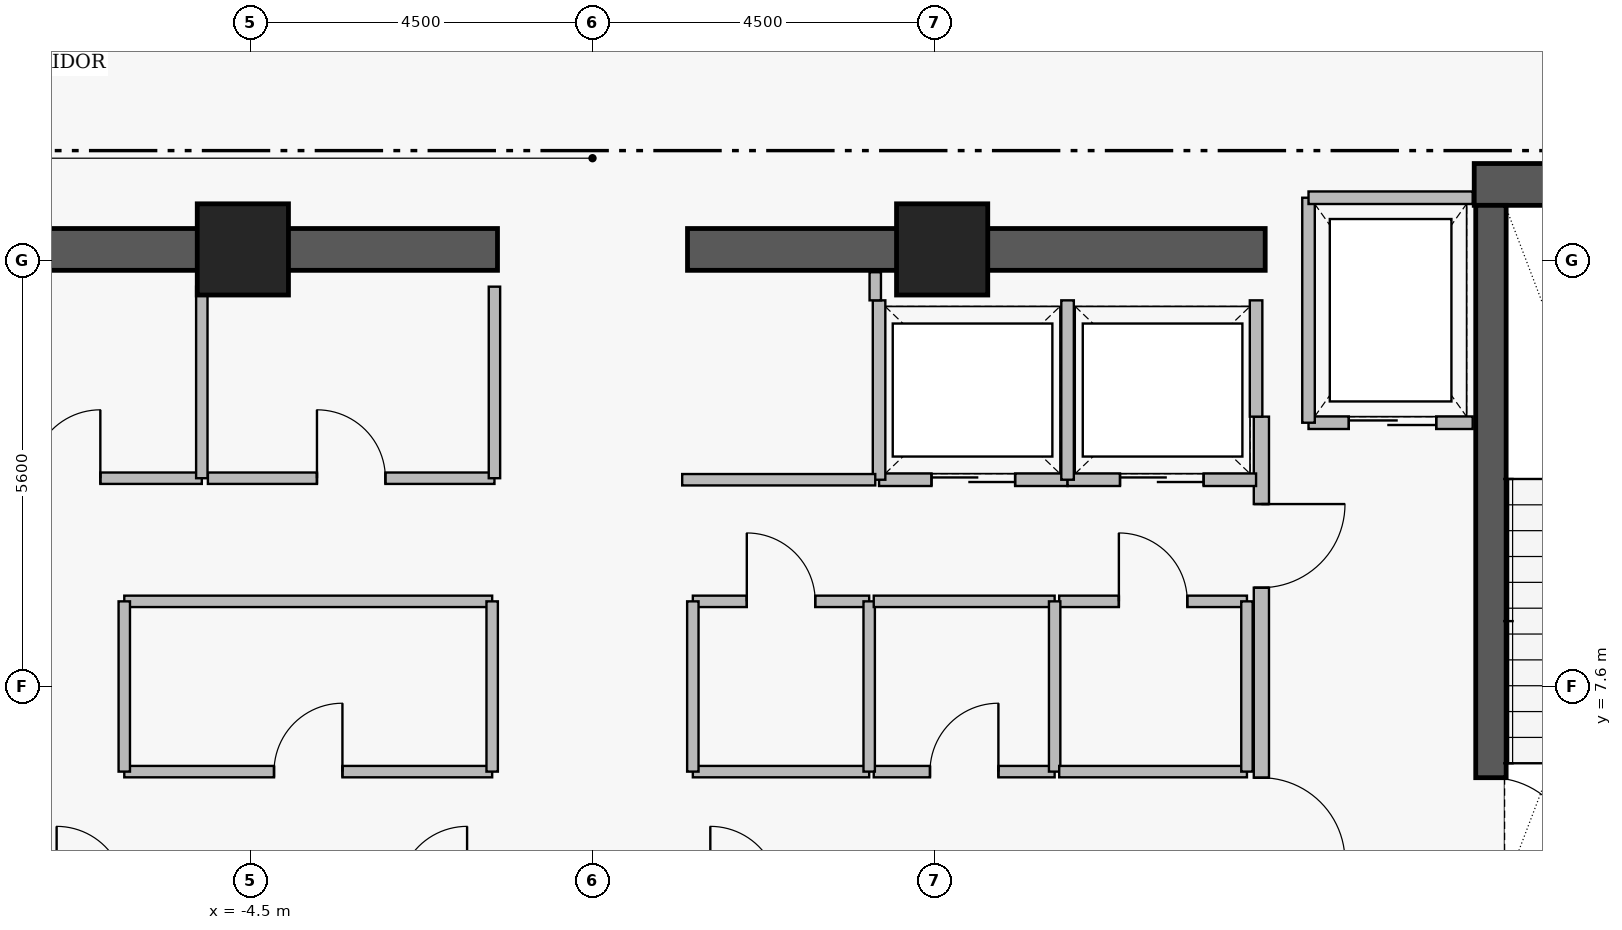
"""IFC4 building model, lengths in metres.
Left out: names, types, materials, properties, quantities, classifications, styles, units other than length and angle.
Written with IfcOpenShell. Run it as: python <this file> out.ifc"""

import sys

from ifc_helpers import new_model, si_unit, direction, frame, frame_2d, origin, origin_2d, place, context, subcontext, project, spatial, rectangle, extrude, element, fill, save


model = new_model("IFC4")
c1 = context("Model", 3, precision=1e-05, world=origin(), true_north=direction((0.0, 1.0)))
c2 = subcontext(c1, "Body", "Model", "MODEL_VIEW")
j1 = project(units=[si_unit("LENGTHUNIT", "METRE"), si_unit("PLANEANGLEUNIT", "RADIAN")], contexts=[c1])
p1 = place(None, origin())
s1 = spatial("IfcSite", under=j1, at=p1, CompositionType="ELEMENT")
p2 = place(p1, origin())
s2 = spatial("IfcBuilding", under=s1, at=p2, CompositionType="ELEMENT")
p3 = place(p2, frame((0.0, 0.0, 284.05)))
s3 = spatial("IfcBuildingStorey", under=s2, at=p3, CompositionType="ELEMENT", Elevation=284.05)
p4 = place(p3, frame((11.6, 14.205, 0.0), z_axis=(0.0, 0.0, 1.0), x_axis=(1.0, 0.0, 0.0)))
e1 = element("IfcWall", 1, at=p4, inside=s3, PredefinedType="SHEAR", context=c2, shape_type="SweptSolid", body=[
    extrude(rectangle(XDim=4.36, YDim=0.55, at=frame_2d((2.18, 0.0))), origin(), (0.0, 0.0, 1.0), 4.21),
])
for number, where, z_axis, x_axis in (
    (2, (-8.85, 13.35, 0.0), (0.0, 0.0, 1.0), (1.0, 0.0, 0.0)),
    (3, (1.25, 13.35, 0.0), (0.0, 0.0, 1.0), (1.0, 0.0, 0.0)),
):
    element("IfcWall", number, at=place(p3, frame(where, z_axis=z_axis, x_axis=x_axis)), inside=s3, PredefinedType="SHEAR", context=c2, shape_type="SweptSolid", body=[
        extrude(rectangle(XDim=7.6, YDim=0.55, at=frame_2d((3.8, 0.0))), origin(), (0.0, 0.0, 1.0), 4.18),
    ])
p5 = place(p3, frame((11.82, 13.93, 0.0), z_axis=(0.0, 0.0, 1.0), x_axis=(0.0, -1.0, 0.0)))
e4 = element("IfcWall", 4, at=p5, inside=s3, PredefinedType="SHEAR", context=c2, shape_type="SweptSolid", body=[
    extrude(rectangle(XDim=8.96, YDim=0.4, at=frame_2d((4.48, 0.0))), origin(), (0.0, 0.0, 1.0), 4.21),
])
p6 = place(p5, frame((7.53, 0.0, 0.0)))
e5 = element("IfcOpeningElement", 5, at=p6, cuts=e4, PredefinedType="OPENING", context=c2, shape_type="SweptSolid", body=[
    extrude(rectangle(XDim=1.12, YDim=2.22, at=frame_2d((0.56, 1.11))), frame((0.0, 0.21, 0.0), z_axis=(0.0, -1.0, 0.0), x_axis=(1.0, 0.0, 0.0)), (0.0, 0.0, 1.0), 0.42),
])
for number, where, z_axis, x_axis in (
    (6, (-4.6, 13.35, 0.0), (0.0, 0.0, 1.0), (1.0, 0.0, 0.0)),
    (7, (4.6, 13.35, 0.0), (0.0, 0.0, 1.0), (1.0, 0.0, 0.0)),
):
    element("IfcColumn", number, at=place(p3, frame(where, z_axis=z_axis, x_axis=x_axis)), inside=s3, PredefinedType="COLUMN", context=c2, shape_type="SweptSolid", body=[
        extrude(rectangle(XDim=1.2, YDim=1.2, at=origin_2d()), origin(), (0.0, 0.0, 1.0), 4.4),
    ])
p7 = place(p3, frame((8.8, 11.15, 0.0), z_axis=(0.0, 0.0, 1.0), x_axis=(0.0, -1.0, 0.0)))
e8 = element("IfcWall", 8, at=p7, inside=s3, PredefinedType="PARTITIONING", context=c2, shape_type="SweptSolid", body=[
    extrude(rectangle(XDim=6.1, YDim=0.2, at=frame_2d((3.05, 0.0))), origin(), (0.0, 0.0, 1.0), 4.18),
])
p8 = place(p7, frame((1.15, 0.0, 0.0)))
e9 = element("IfcOpeningElement", 9, at=p8, cuts=e8, PredefinedType="OPENING", context=c2, shape_type="SweptSolid", body=[
    extrude(rectangle(XDim=1.1, YDim=2.2, at=frame_2d((0.55, 1.1))), frame((0.0, 0.11, 0.0), z_axis=(0.0, -1.0, 0.0), x_axis=(1.0, 0.0, 0.0)), (0.0, 0.0, 1.0), 0.22),
])
p9 = place(p7, frame((4.75, 0.0, 0.0)))
e10 = element("IfcOpeningElement", 10, at=p9, cuts=e8, PredefinedType="OPENING", context=c2, shape_type="SweptSolid", body=[
    extrude(rectangle(XDim=1.1, YDim=2.2, at=frame_2d((0.55, 1.1))), frame((0.0, 0.11, 0.0), z_axis=(0.0, -1.0, 0.0), x_axis=(1.0, 0.0, 0.0)), (0.0, 0.0, 1.0), 0.22),
])
p10 = place(p3, frame((9.42, 11.07, 0.0), z_axis=(0.0, 0.0, 1.0), x_axis=(1.0, 0.0, 0.0)))
e11 = element("IfcWall", 11, at=p10, inside=s3, PredefinedType="PARTITIONING", context=c2, shape_type="SweptSolid", body=[
    extrude(rectangle(XDim=2.16, YDim=0.165, at=frame_2d((1.08, 0.0))), origin(), (0.0, 0.0, 1.0), 4.18),
])
p11 = place(p10, frame((0.53, 0.0, 0.0)))
e12 = element("IfcOpeningElement", 12, at=p11, cuts=e11, PredefinedType="OPENING", context=c2, shape_type="SweptSolid", body=[
    extrude(rectangle(XDim=1.15, YDim=2.25, at=frame_2d((0.575, 1.125))), frame((0.0, 0.093, 0.0), z_axis=(0.0, -1.0, 0.0), x_axis=(1.0, 0.0, 0.0)), (0.0, 0.0, 1.0), 0.185),
])
p12 = place(p3, frame((3.77, 10.32, 0.0), z_axis=(0.0, 0.0, 1.0), x_axis=(1.0, 0.0, 0.0)))
e13 = element("IfcWall", 13, at=p12, inside=s3, PredefinedType="PARTITIONING", context=c2, shape_type="SweptSolid", body=[
    extrude(rectangle(XDim=2.48, YDim=0.165, at=frame_2d((1.24, 0.0))), origin(), (0.0, 0.0, 1.0), 4.18),
])
p13 = place(p12, frame((0.69, 0.0, 0.0)))
e14 = element("IfcOpeningElement", 14, at=p13, cuts=e13, PredefinedType="OPENING", context=c2, shape_type="SweptSolid", body=[
    extrude(rectangle(XDim=1.1, YDim=2.25, at=frame_2d((0.55, 1.125))), frame((0.0, 0.093, 0.0), z_axis=(0.0, -1.0, 0.0), x_axis=(1.0, 0.0, 0.0)), (0.0, 0.0, 1.0), 0.185),
])
p14 = place(p3, frame((6.25, 10.32, 0.0), z_axis=(0.0, 0.0, 1.0), x_axis=(1.0, 0.0, 0.0)))
e15 = element("IfcWall", 15, at=p14, inside=s3, PredefinedType="PARTITIONING", context=c2, shape_type="SweptSolid", body=[
    extrude(rectangle(XDim=2.48, YDim=0.165, at=frame_2d((1.24, 0.0))), origin(), (0.0, 0.0, 1.0), 4.18),
])
p15 = place(p14, frame((0.69, 0.0, 0.0)))
e16 = element("IfcOpeningElement", 16, at=p15, cuts=e15, PredefinedType="OPENING", context=c2, shape_type="SweptSolid", body=[
    extrude(rectangle(XDim=1.1, YDim=2.25, at=frame_2d((0.55, 1.125))), frame((0.0, 0.093, 0.0), z_axis=(0.0, -1.0, 0.0), x_axis=(1.0, 0.0, 0.0)), (0.0, 0.0, 1.0), 0.185),
])
p16 = place(p3, frame((-8.71, 10.34, 0.0), z_axis=(0.0, 0.0, 1.0), x_axis=(1.0, 0.0, 0.0)))
e17 = element("IfcWall", 17, at=p16, inside=s3, PredefinedType="PARTITIONING", context=c2, shape_type="SweptSolid", body=[
    extrude(rectangle(XDim=3.57, YDim=0.15, at=frame_2d((1.785, 0.0))), origin(), (0.0, 0.0, 1.0), 4.18),
])
p17 = place(p16, frame((1.335, 0.0, 0.0)))
e18 = element("IfcOpeningElement", 18, at=p17, cuts=e17, PredefinedType="OPENING", context=c2, shape_type="SweptSolid", body=[
    extrude(rectangle(XDim=0.9, YDim=2.15, at=frame_2d((0.45, 1.075))), frame((0.0, 0.085, 0.0), z_axis=(0.0, -1.0, 0.0), x_axis=(1.0, 0.0, 0.0)), (0.0, 0.0, 1.0), 0.17),
])
p18 = place(p3, frame((-5.06, 10.34, 0.0), z_axis=(0.0, 0.0, 1.0), x_axis=(1.0, 0.0, 0.0)))
e19 = element("IfcWall", 19, at=p18, inside=s3, PredefinedType="PARTITIONING", context=c2, shape_type="SweptSolid", body=[
    extrude(rectangle(XDim=3.77, YDim=0.15, at=frame_2d((1.885, 0.0))), origin(), (0.0, 0.0, 1.0), 4.18),
])
p19 = place(p18, frame((1.435, 0.0, 0.0)))
e20 = element("IfcOpeningElement", 20, at=p19, cuts=e19, PredefinedType="OPENING", context=c2, shape_type="SweptSolid", body=[
    extrude(rectangle(XDim=0.9, YDim=2.15, at=frame_2d((0.45, 1.075))), frame((0.0, 0.085, 0.0), z_axis=(0.0, -1.0, 0.0), x_axis=(1.0, 0.0, 0.0)), (0.0, 0.0, 1.0), 0.17),
])
p20 = place(p3, frame((-6.16, 6.48, 0.0), z_axis=(0.0, 0.0, 1.0), x_axis=(1.0, 0.0, 0.0)))
e21 = element("IfcWall", 21, at=p20, inside=s3, PredefinedType="PARTITIONING", context=c2, shape_type="SweptSolid", body=[
    extrude(rectangle(XDim=4.84, YDim=0.15, at=frame_2d((2.42, 0.0))), origin(), (0.0, 0.0, 1.0), 4.18),
])
p21 = place(p20, frame((1.97, 0.0, 0.0)))
e22 = element("IfcOpeningElement", 22, at=p21, cuts=e21, PredefinedType="OPENING", context=c2, shape_type="SweptSolid", body=[
    extrude(rectangle(XDim=0.9, YDim=2.15, at=frame_2d((0.45, 1.075))), frame((0.0, 0.085, 0.0), z_axis=(0.0, -1.0, 0.0), x_axis=(1.0, 0.0, 0.0)), (0.0, 0.0, 1.0), 0.17),
])
p22 = place(p3, frame((1.32, 8.72, 0.0), z_axis=(0.0, 0.0, 1.0), x_axis=(1.0, 0.0, 0.0)))
e23 = element("IfcWall", 23, at=p22, inside=s3, PredefinedType="PARTITIONING", context=c2, shape_type="SweptSolid", body=[
    extrude(rectangle(XDim=2.32, YDim=0.15, at=frame_2d((1.16, 0.0))), origin(), (0.0, 0.0, 1.0), 4.18),
])
p23 = place(p22, frame((0.71, 0.0, 0.0)))
e24 = element("IfcOpeningElement", 24, at=p23, cuts=e23, PredefinedType="OPENING", context=c2, shape_type="SweptSolid", body=[
    extrude(rectangle(XDim=0.9, YDim=2.15, at=frame_2d((0.45, 1.075))), frame((0.0, 0.085, 0.0), z_axis=(0.0, -1.0, 0.0), x_axis=(1.0, 0.0, 0.0)), (0.0, 0.0, 1.0), 0.17),
])
p24 = place(p3, frame((3.7, 6.48, 0.0), z_axis=(0.0, 0.0, 1.0), x_axis=(1.0, 0.0, 0.0)))
e25 = element("IfcWall", 25, at=p24, inside=s3, PredefinedType="PARTITIONING", context=c2, shape_type="SweptSolid", body=[
    extrude(rectangle(XDim=2.38, YDim=0.15, at=frame_2d((1.19, 0.0))), origin(), (0.0, 0.0, 1.0), 4.18),
])
p25 = place(p24, frame((0.74, 0.0, 0.0)))
e26 = element("IfcOpeningElement", 26, at=p25, cuts=e25, PredefinedType="OPENING", context=c2, shape_type="SweptSolid", body=[
    extrude(rectangle(XDim=0.9, YDim=2.15, at=frame_2d((0.45, 1.075))), frame((0.0, 0.085, 0.0), z_axis=(0.0, -1.0, 0.0), x_axis=(1.0, 0.0, 0.0)), (0.0, 0.0, 1.0), 0.17),
])
p26 = place(p3, frame((6.14, 8.72, 0.0), z_axis=(0.0, 0.0, 1.0), x_axis=(1.0, 0.0, 0.0)))
e27 = element("IfcWall", 27, at=p26, inside=s3, PredefinedType="PARTITIONING", context=c2, shape_type="SweptSolid", body=[
    extrude(rectangle(XDim=2.47, YDim=0.15, at=frame_2d((1.235, 0.0))), origin(), (0.0, 0.0, 1.0), 4.18),
])
p27 = place(p26, frame((0.785, 0.0, 0.0)))
e28 = element("IfcOpeningElement", 28, at=p27, cuts=e27, PredefinedType="OPENING", context=c2, shape_type="SweptSolid", body=[
    extrude(rectangle(XDim=0.9, YDim=2.15, at=frame_2d((0.45, 1.075))), frame((0.0, 0.085, 0.0), z_axis=(0.0, -1.0, 0.0), x_axis=(1.0, 0.0, 0.0)), (0.0, 0.0, 1.0), 0.17),
])
p28 = place(p3, frame((9.42, 11.07, 0.0), z_axis=(0.0, 0.0, 1.0), x_axis=(0.0, 1.0, 0.0)))
e29 = element("IfcWall", 29, at=p28, inside=s3, PredefinedType="PARTITIONING", context=c2, shape_type="SweptSolid", body=[
    extrude(rectangle(XDim=2.96, YDim=0.165, at=frame_2d((1.48, 0.0))), origin(), (0.0, 0.0, 1.0), 4.18),
])
p29 = place(p3, frame((9.42, 14.03, 0.0), z_axis=(0.0, 0.0, 1.0), x_axis=(1.0, 0.0, 0.0)))
e30 = element("IfcWall", 30, at=p29, inside=s3, PredefinedType="PARTITIONING", context=c2, shape_type="SweptSolid", body=[
    extrude(rectangle(XDim=2.16, YDim=0.165, at=frame_2d((1.08, 0.0))), origin(), (0.0, 0.0, 1.0), 4.18),
])
for number, where, z_axis, x_axis in (
    (31, (3.77, 10.32, 0.0), (0.0, 0.0, 1.0), (0.0, 1.0, 0.0)),
    (32, (6.25, 10.32, 0.0), (0.0, 0.0, 1.0), (0.0, 1.0, 0.0)),
):
    element("IfcWall", number, at=place(p3, frame(where, z_axis=z_axis, x_axis=x_axis)), inside=s3, PredefinedType="PARTITIONING", context=c2, shape_type="SweptSolid", body=[
        extrude(rectangle(XDim=2.36, YDim=0.165, at=frame_2d((1.18, 0.0))), origin(), (0.0, 0.0, 1.0), 4.18),
    ])
p30 = place(p3, frame((8.73, 11.15, 0.0), z_axis=(0.0, 0.0, 1.0), x_axis=(0.0, 1.0, 0.0)))
e33 = element("IfcWall", 33, at=p30, inside=s3, PredefinedType="PARTITIONING", context=c2, shape_type="SweptSolid", body=[
    extrude(rectangle(XDim=1.53, YDim=0.165, at=frame_2d((0.765, 0.0))), origin(), (0.0, 0.0, 1.0), 4.18),
])
for number, where, z_axis, x_axis in (
    (34, (-5.14, 10.34, 0.0), (0.0, 0.0, 1.0), (0.0, 1.0, 0.0)),
    (35, (-1.29, 10.34, 0.0), (0.0, 0.0, 1.0), (0.0, 1.0, 0.0)),
):
    element("IfcWall", number, at=place(p3, frame(where, z_axis=z_axis, x_axis=x_axis)), inside=s3, PredefinedType="PARTITIONING", context=c2, shape_type="SweptSolid", body=[
        extrude(rectangle(XDim=2.52, YDim=0.15, at=frame_2d((1.26, 0.0))), origin(), (0.0, 0.0, 1.0), 4.18),
    ])
p31 = place(p3, frame((-6.16, 8.72, 0.0), z_axis=(0.0, 0.0, 1.0), x_axis=(1.0, 0.0, 0.0)))
e36 = element("IfcWall", 36, at=p31, inside=s3, PredefinedType="PARTITIONING", context=c2, shape_type="SweptSolid", body=[
    extrude(rectangle(XDim=4.84, YDim=0.15, at=frame_2d((2.42, 0.0))), origin(), (0.0, 0.0, 1.0), 4.18),
])
for number, where, z_axis, x_axis in (
    (37, (-6.16, 6.48, 0.0), (0.0, 0.0, 1.0), (0.0, 1.0, 0.0)),
    (38, (-1.32, 6.48, 0.0), (0.0, 0.0, 1.0), (0.0, 1.0, 0.0)),
):
    element("IfcWall", number, at=place(p3, frame(where, z_axis=z_axis, x_axis=x_axis)), inside=s3, PredefinedType="PARTITIONING", context=c2, shape_type="SweptSolid", body=[
        extrude(rectangle(XDim=2.24, YDim=0.15, at=frame_2d((1.12, 0.0))), origin(), (0.0, 0.0, 1.0), 4.18),
    ])
p32 = place(p3, frame((1.32, 6.48, 0.0), z_axis=(0.0, 0.0, 1.0), x_axis=(1.0, 0.0, 0.0)))
e39 = element("IfcWall", 39, at=p32, inside=s3, PredefinedType="PARTITIONING", context=c2, shape_type="SweptSolid", body=[
    extrude(rectangle(XDim=2.32, YDim=0.15, at=frame_2d((1.16, 0.0))), origin(), (0.0, 0.0, 1.0), 4.18),
])
for number, where, z_axis, x_axis in (
    (40, (1.32, 6.48, 0.0), (0.0, 0.0, 1.0), (0.0, 1.0, 0.0)),
    (41, (3.64, 6.48, 0.0), (0.0, 0.0, 1.0), (0.0, 1.0, 0.0)),
):
    element("IfcWall", number, at=place(p3, frame(where, z_axis=z_axis, x_axis=x_axis)), inside=s3, PredefinedType="PARTITIONING", context=c2, shape_type="SweptSolid", body=[
        extrude(rectangle(XDim=2.24, YDim=0.15, at=frame_2d((1.12, 0.0))), origin(), (0.0, 0.0, 1.0), 4.18),
    ])
p33 = place(p3, frame((3.7, 8.72, 0.0), z_axis=(0.0, 0.0, 1.0), x_axis=(1.0, 0.0, 0.0)))
e42 = element("IfcWall", 42, at=p33, inside=s3, PredefinedType="PARTITIONING", context=c2, shape_type="SweptSolid", body=[
    extrude(rectangle(XDim=2.38, YDim=0.15, at=frame_2d((1.19, 0.0))), origin(), (0.0, 0.0, 1.0), 4.18),
])
p34 = place(p3, frame((6.08, 6.48, 0.0), z_axis=(0.0, 0.0, 1.0), x_axis=(0.0, 1.0, 0.0)))
e43 = element("IfcWall", 43, at=p34, inside=s3, PredefinedType="PARTITIONING", context=c2, shape_type="SweptSolid", body=[
    extrude(rectangle(XDim=2.24, YDim=0.15, at=frame_2d((1.12, 0.0))), origin(), (0.0, 0.0, 1.0), 4.18),
])
p35 = place(p3, frame((6.14, 6.48, 0.0), z_axis=(0.0, 0.0, 1.0), x_axis=(1.0, 0.0, 0.0)))
e44 = element("IfcWall", 44, at=p35, inside=s3, PredefinedType="PARTITIONING", context=c2, shape_type="SweptSolid", body=[
    extrude(rectangle(XDim=2.47, YDim=0.15, at=frame_2d((1.235, 0.0))), origin(), (0.0, 0.0, 1.0), 4.18),
])
p36 = place(p3, frame((8.61, 6.48, 0.0), z_axis=(0.0, 0.0, 1.0), x_axis=(0.0, 1.0, 0.0)))
e45 = element("IfcWall", 45, at=p36, inside=s3, PredefinedType="PARTITIONING", context=c2, shape_type="SweptSolid", body=[
    extrude(rectangle(XDim=2.24, YDim=0.15, at=frame_2d((1.12, 0.0))), origin(), (0.0, 0.0, 1.0), 4.18),
])
p37 = place(p3, frame((1.18, 10.32, 0.0), z_axis=(0.0, 0.0, 1.0), x_axis=(1.0, 0.0, 0.0)))
e46 = element("IfcWall", 46, at=p37, inside=s3, PredefinedType="PARTITIONING", context=c2, shape_type="SweptSolid", body=[
    extrude(rectangle(XDim=2.54, YDim=0.15, at=frame_2d((1.27, 0.0))), origin(), (0.0, 0.0, 1.0), 4.18),
])
p38 = place(p3, frame((3.72, 12.68, 0.0), z_axis=(0.0, 0.0, 1.0), x_axis=(0.0, 1.0, 0.0)))
e47 = element("IfcWall", 47, at=p38, inside=s3, PredefinedType="PARTITIONING", context=c2, shape_type="SweptSolid", body=[
    extrude(rectangle(XDim=0.37, YDim=0.15, at=frame_2d((0.185, 0.0))), origin(), (0.0, 0.0, 1.0), 4.18),
])
p39 = place(p6, origin())
e48 = element("IfcDoor", 48, at=p39, inside=s3, OperationType="SINGLE_SWING_RIGHT", PredefinedType="DOOR", context=c2, shape_type="SweptSolid", body=[
    extrude(rectangle(XDim=1.12, YDim=2.22, at=frame_2d((0.56, 1.11))), frame((0.0, 0.025, 0.0), z_axis=(0.0, -1.0, 0.0), x_axis=(1.0, 0.0, 0.0)), (0.0, 0.0, 1.0), 0.05),
])
fill(e5, e48)
p40 = place(p8, origin())
e49 = element("IfcDoor", 49, at=p40, inside=s3, OperationType="SINGLE_SWING_LEFT", PredefinedType="DOOR", context=c2, shape_type="SweptSolid", body=[
    extrude(rectangle(XDim=1.1, YDim=2.2, at=frame_2d((0.55, 1.1))), frame((0.0, 0.025, 0.0), z_axis=(0.0, -1.0, 0.0), x_axis=(1.0, 0.0, 0.0)), (0.0, 0.0, 1.0), 0.05),
])
fill(e9, e49)
p41 = place(p9, origin())
e50 = element("IfcDoor", 50, at=p41, inside=s3, OperationType="SINGLE_SWING_RIGHT", PredefinedType="DOOR", context=c2, shape_type="SweptSolid", body=[
    extrude(rectangle(XDim=1.1, YDim=2.2, at=frame_2d((0.55, 1.1))), frame((0.0, 0.025, 0.0), z_axis=(0.0, -1.0, 0.0), x_axis=(1.0, 0.0, 0.0)), (0.0, 0.0, 1.0), 0.05),
])
fill(e10, e50)
p42 = place(p11, origin())
e51 = element("IfcDoor", 51, at=p42, inside=s3, OperationType="SLIDING_TO_LEFT", PredefinedType="DOOR", context=c2, shape_type="SweptSolid", body=[
    extrude(rectangle(XDim=1.15, YDim=2.25, at=frame_2d((0.575, 1.125))), frame((0.0, 0.025, 0.0), z_axis=(0.0, -1.0, 0.0), x_axis=(1.0, 0.0, 0.0)), (0.0, 0.0, 1.0), 0.05),
])
fill(e12, e51)
p43 = place(p13, origin())
e52 = element("IfcDoor", 52, at=p43, inside=s3, OperationType="SLIDING_TO_LEFT", PredefinedType="DOOR", context=c2, shape_type="SweptSolid", body=[
    extrude(rectangle(XDim=1.1, YDim=2.25, at=frame_2d((0.55, 1.125))), frame((0.0, 0.025, 0.0), z_axis=(0.0, -1.0, 0.0), x_axis=(1.0, 0.0, 0.0)), (0.0, 0.0, 1.0), 0.05),
])
fill(e14, e52)
p44 = place(p15, origin())
e53 = element("IfcDoor", 53, at=p44, inside=s3, OperationType="SLIDING_TO_LEFT", PredefinedType="DOOR", context=c2, shape_type="SweptSolid", body=[
    extrude(rectangle(XDim=1.1, YDim=2.25, at=frame_2d((0.55, 1.125))), frame((0.0, 0.025, 0.0), z_axis=(0.0, -1.0, 0.0), x_axis=(1.0, 0.0, 0.0)), (0.0, 0.0, 1.0), 0.05),
])
fill(e16, e53)
p45 = place(p17, origin())
e54 = element("IfcDoor", 54, at=p45, inside=s3, OperationType="SINGLE_SWING_RIGHT", PredefinedType="DOOR", context=c2, shape_type="SweptSolid", body=[
    extrude(rectangle(XDim=0.9, YDim=2.15, at=frame_2d((0.45, 1.075))), frame((0.0, 0.025, 0.0), z_axis=(0.0, -1.0, 0.0), x_axis=(1.0, 0.0, 0.0)), (0.0, 0.0, 1.0), 0.05),
])
fill(e18, e54)
p46 = place(p19, origin())
e55 = element("IfcDoor", 55, at=p46, inside=s3, OperationType="SINGLE_SWING_LEFT", PredefinedType="DOOR", context=c2, shape_type="SweptSolid", body=[
    extrude(rectangle(XDim=0.9, YDim=2.15, at=frame_2d((0.45, 1.075))), frame((0.0, 0.025, 0.0), z_axis=(0.0, -1.0, 0.0), x_axis=(1.0, 0.0, 0.0)), (0.0, 0.0, 1.0), 0.05),
])
fill(e20, e55)
p47 = place(p21, origin())
e56 = element("IfcDoor", 56, at=p47, inside=s3, OperationType="SINGLE_SWING_RIGHT", PredefinedType="DOOR", context=c2, shape_type="SweptSolid", body=[
    extrude(rectangle(XDim=0.9, YDim=2.15, at=frame_2d((0.45, 1.075))), frame((0.0, 0.025, 0.0), z_axis=(0.0, -1.0, 0.0), x_axis=(1.0, 0.0, 0.0)), (0.0, 0.0, 1.0), 0.05),
])
fill(e22, e56)
p48 = place(p23, origin())
e57 = element("IfcDoor", 57, at=p48, inside=s3, OperationType="SINGLE_SWING_LEFT", PredefinedType="DOOR", context=c2, shape_type="SweptSolid", body=[
    extrude(rectangle(XDim=0.9, YDim=2.15, at=frame_2d((0.45, 1.075))), frame((0.0, 0.025, 0.0), z_axis=(0.0, -1.0, 0.0), x_axis=(1.0, 0.0, 0.0)), (0.0, 0.0, 1.0), 0.05),
])
fill(e24, e57)
p49 = place(p25, origin())
e58 = element("IfcDoor", 58, at=p49, inside=s3, OperationType="SINGLE_SWING_RIGHT", PredefinedType="DOOR", context=c2, shape_type="SweptSolid", body=[
    extrude(rectangle(XDim=0.9, YDim=2.15, at=frame_2d((0.45, 1.075))), frame((0.0, 0.025, 0.0), z_axis=(0.0, -1.0, 0.0), x_axis=(1.0, 0.0, 0.0)), (0.0, 0.0, 1.0), 0.05),
])
fill(e26, e58)
p50 = place(p27, origin())
e59 = element("IfcDoor", 59, at=p50, inside=s3, OperationType="SINGLE_SWING_LEFT", PredefinedType="DOOR", context=c2, shape_type="SweptSolid", body=[
    extrude(rectangle(XDim=0.9, YDim=2.15, at=frame_2d((0.45, 1.075))), frame((0.0, 0.025, 0.0), z_axis=(0.0, -1.0, 0.0), x_axis=(1.0, 0.0, 0.0)), (0.0, 0.0, 1.0), 0.05),
])
fill(e28, e59)
save(model, sys.argv[1])
